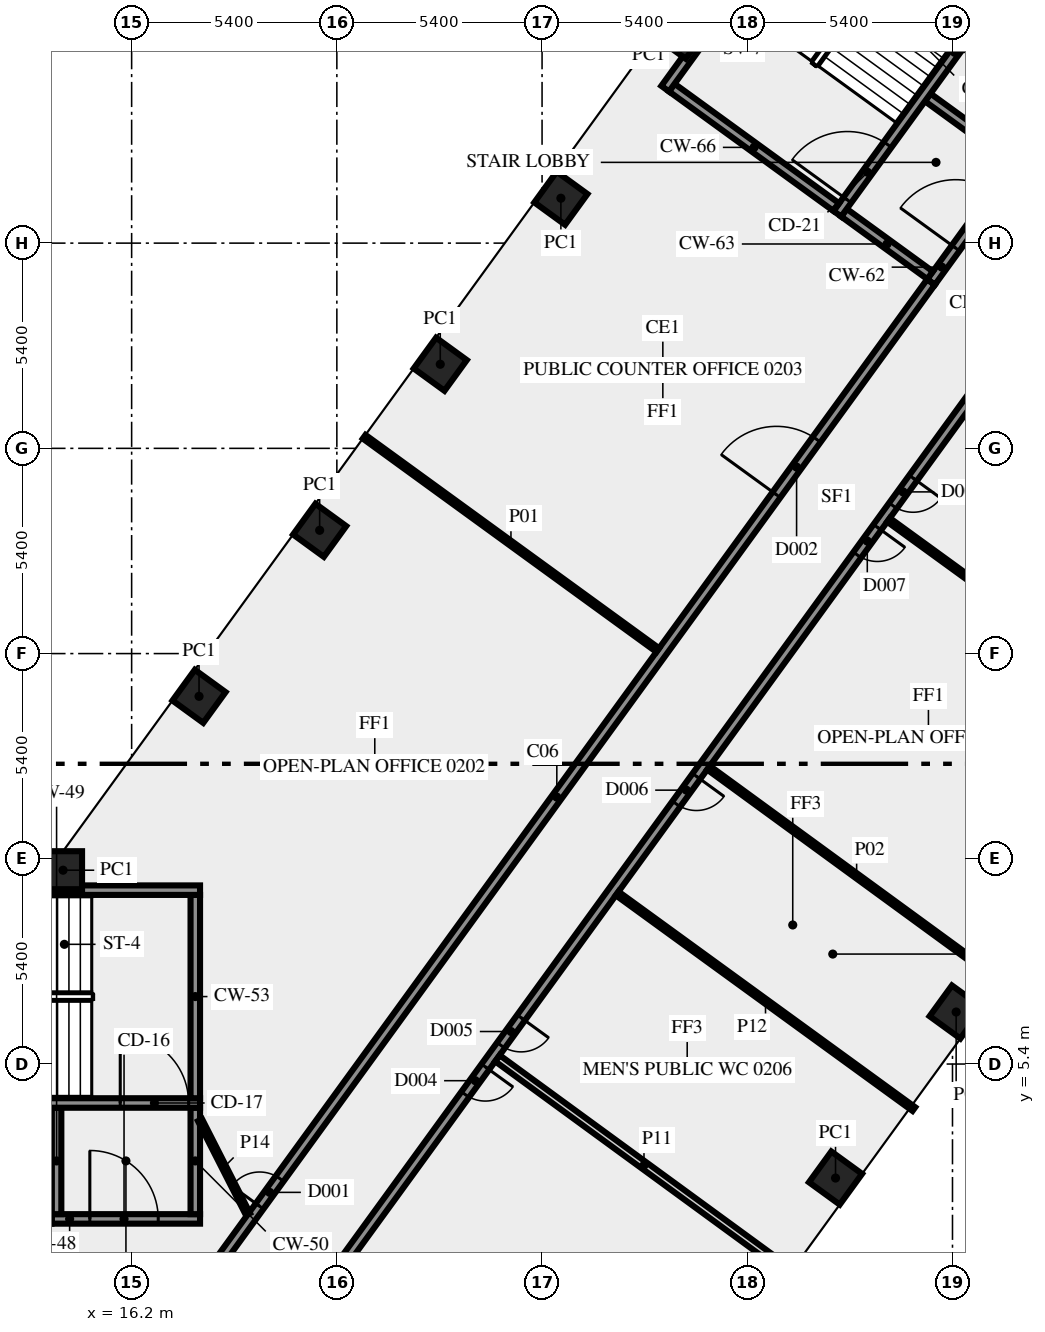
"""IFC4 building model, lengths in metres.
Left out: names, types, materials, properties, quantities, classifications, styles, units other than length and angle.
Written with IfcOpenShell. Run it as: python <this file> out.ifc"""

import sys

from ifc_helpers import new_model, si_unit, direction, frame, frame_2d, origin, origin_2d, place, context, subcontext, project, spatial, rectangle, extrude, element, fill, save


model = new_model("IFC4")
c1 = context("Model", 3, precision=1e-05, world=origin(), true_north=direction((0.0, 1.0)))
c2 = subcontext(c1, "Body", "Model", "MODEL_VIEW")
j1 = project(units=[si_unit("LENGTHUNIT", "METRE"), si_unit("PLANEANGLEUNIT", "RADIAN")], contexts=[c1])
p1 = place(None, origin())
s1 = spatial("IfcSite", under=j1, at=p1, CompositionType="ELEMENT")
p2 = place(p1, origin())
s2 = spatial("IfcBuilding", under=s1, at=p2, CompositionType="ELEMENT")
p3 = place(p2, frame((0.0, 0.0, 11.5)))
s3 = spatial("IfcBuildingStorey", under=s2, at=p3, CompositionType="ELEMENT", Elevation=11.5)
for number, where, z_axis, x_axis in (
    (1, (34.722, 2.4, 0.0), (0.0, 0.0, 1.0), (0.588, 0.809, 0.0)),
    (2, (37.896, 6.769, 0.0), (0.0, 0.0, 1.0), (0.588, 0.809, 0.0)),
    (3, (30.669, 32.55, 0.0), (0.0, 0.0, 1.0), (-0.588, -0.809, 0.0)),
    (4, (27.495, 28.181, 0.0), (0.0, 0.0, 1.0), (-0.588, -0.809, 0.0)),
    (5, (24.321, 23.812, 0.0), (0.0, 0.0, 1.0), (-0.588, -0.809, 0.0)),
    (6, (21.147, 19.444, 0.0), (0.0, 0.0, 1.0), (-0.588, -0.809, 0.0)),
    (7, (17.974, 15.075, 0.0), (0.0, 0.0, 1.0), (-0.588, -0.809, 0.0)),
    (8, (14.395, 10.5, 0.0), (0.0, 0.0, 1.0), (-1.0, 0.0, 0.0)),
):
    element("IfcColumn", number, at=place(p3, frame(where, z_axis=z_axis, x_axis=x_axis)), inside=s3, PredefinedType="COLUMN", context=c2, shape_type="SweptSolid", body=[
        extrude(rectangle(XDim=1.0, YDim=1.0, at=origin_2d()), origin(), (0.0, 0.0, 1.0), 4.1),
    ])
p4 = place(p3, frame((14.1, 1.325, 0.0), z_axis=(0.0, 0.0, 1.0), x_axis=(1.0, 0.0, 0.0)))
e9 = element("IfcWall", 9, at=p4, inside=s3, PredefinedType="SHEAR", context=c2, shape_type="SweptSolid", body=[
    extrude(rectangle(XDim=3.9, YDim=0.25, at=frame_2d((1.95, 0.0))), origin(), (0.0, 0.0, 1.0), 4.1),
])
p5 = place(p4, frame((1.0, 0.0, 0.0)))
e10 = element("IfcOpeningElement", 10, at=p5, cuts=e9, PredefinedType="OPENING", context=c2, shape_type="SweptSolid", body=[
    extrude(rectangle(XDim=1.8, YDim=2.1, at=frame_2d((0.9, 1.05))), frame((0.0, 0.135, 0.0), z_axis=(0.0, -1.0, 0.0), x_axis=(1.0, 0.0, 0.0)), (0.0, 0.0, 1.0), 0.27),
])
for number, where, z_axis, x_axis in (
    (11, (14.225, 1.45, 0.0), (0.0, 0.0, 1.0), (0.0, 1.0, 0.0)),
    (12, (17.875, 1.45, 0.0), (0.0, 0.0, 1.0), (0.0, 1.0, 0.0)),
):
    element("IfcWall", number, at=place(p3, frame(where, z_axis=z_axis, x_axis=x_axis)), inside=s3, PredefinedType="SHEAR", context=c2, shape_type="SweptSolid", body=[
        extrude(rectangle(XDim=2.8, YDim=0.25, at=frame_2d((1.4, 0.0))), origin(), (0.0, 0.0, 1.0), 4.1),
    ])
p6 = place(p3, frame((7.5, 4.375, 0.0), z_axis=(0.0, 0.0, 1.0), x_axis=(1.0, 0.0, 0.0)))
e13 = element("IfcWall", 13, at=p6, inside=s3, PredefinedType="SHEAR", context=c2, shape_type="SweptSolid", body=[
    extrude(rectangle(XDim=10.5, YDim=0.25, at=frame_2d((5.25, 0.0))), origin(), (0.0, 0.0, 1.0), 4.1),
])
p7 = place(p6, frame((8.4, 0.0, 0.0)))
e14 = element("IfcOpeningElement", 14, at=p7, cuts=e13, PredefinedType="OPENING", context=c2, shape_type="SweptSolid", body=[
    extrude(rectangle(XDim=1.8, YDim=2.1, at=frame_2d((0.9, 1.05))), frame((0.0, 0.135, 0.0), z_axis=(0.0, -1.0, 0.0), x_axis=(1.0, 0.0, 0.0)), (0.0, 0.0, 1.0), 0.27),
])
p8 = place(p3, frame((17.875, 4.5, 0.0), z_axis=(0.0, 0.0, 1.0), x_axis=(0.0, 1.0, 0.0)))
e15 = element("IfcWall", 15, at=p8, inside=s3, PredefinedType="SHEAR", context=c2, shape_type="SweptSolid", body=[
    extrude(rectangle(XDim=5.35, YDim=0.25, at=frame_2d((2.675, 0.0))), origin(), (0.0, 0.0, 1.0), 4.1),
])
p9 = place(p3, frame((7.5, 9.975, 0.0), z_axis=(0.0, 0.0, 1.0), x_axis=(1.0, 0.0, 0.0)))
e16 = element("IfcWall", 16, at=p9, inside=s3, PredefinedType="SHEAR", context=c2, shape_type="SweptSolid", body=[
    extrude(rectangle(XDim=10.5, YDim=0.25, at=frame_2d((5.25, 0.0))), origin(), (0.0, 0.0, 1.0), 4.1),
])
p10 = place(p9, frame((2.0, 0.0, 1.0)))
e17 = element("IfcOpeningElement", 17, at=p10, cuts=e16, PredefinedType="OPENING", context=c2, shape_type="SweptSolid", body=[
    extrude(rectangle(XDim=1.2, YDim=1.2, at=frame_2d((0.6, 0.6))), frame((0.0, 0.135, 0.0), z_axis=(0.0, -1.0, 0.0), x_axis=(1.0, 0.0, 0.0)), (0.0, 0.0, 1.0), 0.27),
])
p11 = place(p3, frame((37.238, 25.98, 0.0), z_axis=(0.0, 0.0, 1.0), x_axis=(0.587772420479, 0.809026317077, 0.0)))
e18 = element("IfcWall", 18, at=p11, inside=s3, PredefinedType="SHEAR", context=c2, shape_type="SweptSolid", body=[
    extrude(rectangle(XDim=4.0, YDim=0.25, at=frame_2d((2.0, 0.0))), origin(), (0.0, 0.0, 1.0), 4.1),
])
p12 = place(p11, frame((1.1, 0.0, 0.0)))
e19 = element("IfcOpeningElement", 19, at=p12, cuts=e18, PredefinedType="OPENING", context=c2, shape_type="SweptSolid", body=[
    extrude(rectangle(XDim=1.8, YDim=2.1, at=frame_2d((0.9, 1.05))), frame((0.0, 0.135, 0.0), z_axis=(0.0, -1.0, 0.0), x_axis=(1.0, 0.0, 0.0)), (0.0, 0.0, 1.0), 0.27),
])
for number, where, z_axis, x_axis in (
    (20, (37.21, 26.154, 0.0), (0.0, 0.0, 1.0), (-0.809, 0.588, 0.0)),
    (21, (39.414, 29.188, 0.0), (0.0, 0.0, 1.0), (-0.809, 0.588, 0.0)),
):
    element("IfcWall", number, at=place(p3, frame(where, z_axis=z_axis, x_axis=x_axis)), inside=s3, PredefinedType="SHEAR", context=c2, shape_type="SweptSolid", body=[
        extrude(rectangle(XDim=2.8, YDim=0.25, at=frame_2d((1.4, 0.0))), origin(), (0.0, 0.0, 1.0), 4.1),
    ])
p13 = place(p3, frame((34.77, 27.772, 0.0), z_axis=(0.0, 0.0, 1.0), x_axis=(0.587795589702, 0.809009483706, 0.0)))
e22 = element("IfcWall", 22, at=p13, inside=s3, PredefinedType="SHEAR", context=c2, shape_type="SweptSolid", body=[
    extrude(rectangle(XDim=10.5, YDim=0.25, at=frame_2d((5.25, 0.0))), origin(), (0.0, 0.0, 1.0), 4.1),
])
p14 = place(p13, frame((0.45, 0.0, 0.0)))
e23 = element("IfcOpeningElement", 23, at=p14, cuts=e22, PredefinedType="OPENING", context=c2, shape_type="SweptSolid", body=[
    extrude(rectangle(XDim=1.8, YDim=2.1, at=frame_2d((0.9, 1.05))), frame((0.0, 0.135, 0.0), z_axis=(0.0, -1.0, 0.0), x_axis=(1.0, 0.0, 0.0)), (0.0, 0.0, 1.0), 0.27),
])
p15 = place(p3, frame((34.742, 27.947, 0.0), z_axis=(0.0, 0.0, 1.0), x_axis=(-0.8089984606, 0.587810760999, 0.0)))
e24 = element("IfcWall", 24, at=p15, inside=s3, PredefinedType="SHEAR", context=c2, shape_type="SweptSolid", body=[
    extrude(rectangle(XDim=5.35, YDim=0.25, at=frame_2d((2.675, 0.0))), origin(), (0.0, 0.0, 1.0), 4.1),
])
p16 = place(p3, frame((30.24, 31.064, 0.0), z_axis=(0.0, 0.0, 1.0), x_axis=(0.587795589702, 0.809009483706, 0.0)))
e25 = element("IfcWall", 25, at=p16, inside=s3, PredefinedType="SHEAR", context=c2, shape_type="SweptSolid", body=[
    extrude(rectangle(XDim=10.5, YDim=0.25, at=frame_2d((5.25, 0.0))), origin(), (0.0, 0.0, 1.0), 4.1),
])
p17 = place(p16, frame((2.15, 0.0, 1.0)))
e26 = element("IfcOpeningElement", 26, at=p17, cuts=e25, PredefinedType="OPENING", context=c2, shape_type="SweptSolid", body=[
    extrude(rectangle(XDim=1.2, YDim=1.2, at=frame_2d((0.6, 0.6))), frame((0.0, 0.135, 0.0), z_axis=(0.0, -1.0, 0.0), x_axis=(1.0, 0.0, 0.0)), (0.0, 0.0, 1.0), 0.27),
])
p18 = place(p3, frame((49.869, 38.856, 0.0), z_axis=(0.0, 0.0, 1.0), x_axis=(-0.587784522481, -0.809017524614, 0.0)))
e27 = element("IfcWall", 27, at=p18, inside=s3, PredefinedType="SOLIDWALL", context=c2, shape_type="SweptSolid", body=[
    extrude(rectangle(XDim=49.912, YDim=0.25, at=frame_2d((24.956, 0.0))), origin(), (0.0, 0.0, 1.0), 4.1),
])
p19 = place(p18, frame((23.897, 0.0, 0.0)))
e28 = element("IfcOpeningElement", 28, at=p19, cuts=e27, PredefinedType="OPENING", context=c2, shape_type="SweptSolid", body=[
    extrude(rectangle(XDim=0.9, YDim=2.1, at=frame_2d((0.45, 1.05))), frame((0.0, 0.135, 0.0), z_axis=(0.0, -1.0, 0.0), x_axis=(1.0, 0.0, 0.0)), (0.0, 0.0, 1.0), 0.27),
])
p20 = place(p18, frame((14.196, 0.0, 0.0)))
e29 = element("IfcOpeningElement", 29, at=p20, cuts=e27, PredefinedType="OPENING", context=c2, shape_type="SweptSolid", body=[
    extrude(rectangle(XDim=0.9, YDim=2.1, at=frame_2d((0.45, 1.05))), frame((0.0, 0.135, 0.0), z_axis=(0.0, -1.0, 0.0), x_axis=(1.0, 0.0, 0.0)), (0.0, 0.0, 1.0), 0.27),
])
p21 = place(p18, frame((39.847, 0.0, 0.0)))
e30 = element("IfcOpeningElement", 30, at=p21, cuts=e27, PredefinedType="OPENING", context=c2, shape_type="SweptSolid", body=[
    extrude(rectangle(XDim=0.9, YDim=2.1, at=frame_2d((0.45, 1.05))), frame((0.0, 0.135, 0.0), z_axis=(0.0, -1.0, 0.0), x_axis=(1.0, 0.0, 0.0)), (0.0, 0.0, 1.0), 0.27),
])
p22 = place(p18, frame((41.446, 0.0, 0.0)))
e31 = element("IfcOpeningElement", 31, at=p22, cuts=e27, PredefinedType="OPENING", context=c2, shape_type="SweptSolid", body=[
    extrude(rectangle(XDim=0.9, YDim=2.1, at=frame_2d((0.45, 1.05))), frame((0.0, 0.135, 0.0), z_axis=(0.0, -1.0, 0.0), x_axis=(1.0, 0.0, 0.0)), (0.0, 0.0, 1.0), 0.27),
])
p23 = place(p18, frame((31.997, 0.0, 0.0)))
e32 = element("IfcOpeningElement", 32, at=p23, cuts=e27, PredefinedType="OPENING", context=c2, shape_type="SweptSolid", body=[
    extrude(rectangle(XDim=0.9, YDim=2.1, at=frame_2d((0.45, 1.05))), frame((0.0, 0.135, 0.0), z_axis=(0.0, -1.0, 0.0), x_axis=(1.0, 0.0, 0.0)), (0.0, 0.0, 1.0), 0.27),
])
p24 = place(p18, frame((22.296, 0.0, 0.0)))
e33 = element("IfcOpeningElement", 33, at=p24, cuts=e27, PredefinedType="OPENING", context=c2, shape_type="SweptSolid", body=[
    extrude(rectangle(XDim=0.9, YDim=2.1, at=frame_2d((0.45, 1.05))), frame((0.0, 0.135, 0.0), z_axis=(0.0, -1.0, 0.0), x_axis=(1.0, 0.0, 0.0)), (0.0, 0.0, 1.0), 0.27),
])
p25 = place(p3, frame((17.545, -1.125, 0.0), z_axis=(0.0, 0.0, 1.0), x_axis=(0.587786323093, 0.809016216391, 0.0)))
e34 = element("IfcWall", 34, at=p25, inside=s3, PredefinedType="SOLIDWALL", context=c2, shape_type="SweptSolid", body=[
    extrude(rectangle(XDim=33.493, YDim=0.25, at=frame_2d((16.747, 0.0))), origin(), (0.0, 0.0, 1.0), 4.1),
])
p26 = place(p25, frame((3.441, 0.0, 0.0)))
e35 = element("IfcOpeningElement", 35, at=p26, cuts=e34, PredefinedType="OPENING", context=c2, shape_type="SweptSolid", body=[
    extrude(rectangle(XDim=0.9, YDim=2.1, at=frame_2d((0.45, 1.05))), frame((0.0, 0.135, 0.0), z_axis=(0.0, -1.0, 0.0), x_axis=(1.0, 0.0, 0.0)), (0.0, 0.0, 1.0), 0.27),
])
p27 = place(p25, frame((26.58, 0.0, 0.0)))
e36 = element("IfcOpeningElement", 36, at=p27, cuts=e34, PredefinedType="OPENING", context=c2, shape_type="SweptSolid", body=[
    extrude(rectangle(XDim=1.8, YDim=2.1, at=frame_2d((0.9, 1.05))), frame((0.0, 0.135, 0.0), z_axis=(0.0, -1.0, 0.0), x_axis=(1.0, 0.0, 0.0)), (0.0, 0.0, 1.0), 0.27),
])
p28 = place(p3, frame((30.044, 16.292, 0.0), z_axis=(0.0, 0.0, 1.0), x_axis=(-0.80898585166, 0.587828114175, 0.0)))
e37 = element("IfcWall", 37, at=p28, inside=s3, PredefinedType="PARTITIONING", context=c2, shape_type="SweptSolid", body=[
    extrude(rectangle(XDim=9.55, YDim=0.12, at=frame_2d((4.775, 0.0))), origin(), (0.0, 0.0, 1.0), 3.1),
])
p29 = place(p3, frame((31.38, 13.196, 0.0), z_axis=(0.0, 0.0, 1.0), x_axis=(0.807701085448, -0.589592195137, 0.0)))
e38 = element("IfcWall", 38, at=p29, inside=s3, PredefinedType="PARTITIONING", context=c2, shape_type="SweptSolid", body=[
    extrude(rectangle(XDim=9.651, YDim=0.12, at=frame_2d((4.826, 0.0))), origin(), (0.0, 0.0, 1.0), 3.1),
])
p30 = place(p3, frame((43.844, 14.104, 0.0), z_axis=(0.0, 0.0, 1.0), x_axis=(-0.809102944047, 0.587666934526, 0.0)))
e39 = element("IfcWall", 39, at=p30, inside=s3, PredefinedType="PARTITIONING", context=c2, shape_type="SweptSolid", body=[
    extrude(rectangle(XDim=9.55, YDim=0.12, at=frame_2d((4.775, 0.0))), origin(), (0.0, 0.0, 1.0), 3.1),
])
p31 = place(p3, frame((25.826, 5.551, 0.0), z_axis=(0.0, 0.0, 1.0), x_axis=(0.80759810708, -0.589733242612, 0.0)))
e40 = element("IfcWall", 40, at=p31, inside=s3, PredefinedType="SOLIDWALL", context=c2, shape_type="SweptSolid", body=[
    extrude(rectangle(XDim=9.55, YDim=0.2, at=frame_2d((4.775, 0.0))), origin(), (0.0, 0.0, 1.0), 3.1),
])
p32 = place(p3, frame((36.784, 4.215, 0.0), z_axis=(0.0, 0.0, 1.0), x_axis=(-0.808994179369, 0.587816653173, 0.0)))
e41 = element("IfcWall", 41, at=p32, inside=s3, PredefinedType="PARTITIONING", context=c2, shape_type="SweptSolid", body=[
    extrude(rectangle(XDim=9.651, YDim=0.12, at=frame_2d((4.825, 0.0))), origin(), (0.0, 0.0, 1.0), 3.1),
])
p33 = place(p3, frame((18.0, 3.925, 0.0), z_axis=(0.0, 0.0, 1.0), x_axis=(0.453950796792, -0.891026752736, 0.0)))
e42 = element("IfcWall", 42, at=p33, inside=s3, PredefinedType="PARTITIONING", context=c2, shape_type="SweptSolid", body=[
    extrude(rectangle(XDim=2.778, YDim=0.12, at=frame_2d((1.389, 0.0))), origin(), (0.0, 0.0, 1.0), 4.1),
])
p34 = place(p5, origin())
e43 = element("IfcDoor", 43, at=p34, inside=s3, OperationType="DOUBLE_DOOR_SINGLE_SWING", PredefinedType="DOOR", context=c2, shape_type="SweptSolid", body=[
    extrude(rectangle(XDim=1.8, YDim=2.1, at=frame_2d((0.9, 1.05))), frame((0.0, 0.025, 0.0), z_axis=(0.0, -1.0, 0.0), x_axis=(1.0, 0.0, 0.0)), (0.0, 0.0, 1.0), 0.05),
])
fill(e10, e43)
p35 = place(p7, origin())
e44 = element("IfcDoor", 44, at=p35, inside=s3, OperationType="DOUBLE_DOOR_SINGLE_SWING", PredefinedType="DOOR", context=c2, shape_type="SweptSolid", body=[
    extrude(rectangle(XDim=1.8, YDim=2.1, at=frame_2d((0.9, 1.05))), frame((0.0, 0.025, 0.0), z_axis=(0.0, -1.0, 0.0), x_axis=(1.0, 0.0, 0.0)), (0.0, 0.0, 1.0), 0.05),
])
fill(e14, e44)
p36 = place(p12, origin())
e45 = element("IfcDoor", 45, at=p36, inside=s3, OperationType="DOUBLE_DOOR_SINGLE_SWING", PredefinedType="DOOR", context=c2, shape_type="SweptSolid", body=[
    extrude(rectangle(XDim=1.8, YDim=2.1, at=frame_2d((0.9, 1.05))), frame((0.0, 0.025, 0.0), z_axis=(0.0, -1.0, 0.0), x_axis=(1.0, 0.0, 0.0)), (0.0, 0.0, 1.0), 0.05),
])
fill(e19, e45)
p37 = place(p14, origin())
e46 = element("IfcDoor", 46, at=p37, inside=s3, OperationType="DOUBLE_DOOR_SINGLE_SWING", PredefinedType="DOOR", context=c2, shape_type="SweptSolid", body=[
    extrude(rectangle(XDim=1.8, YDim=2.1, at=frame_2d((0.9, 1.05))), frame((0.0, 0.025, 0.0), z_axis=(0.0, -1.0, 0.0), x_axis=(1.0, 0.0, 0.0)), (0.0, 0.0, 1.0), 0.05),
])
fill(e23, e46)
p38 = place(p26, origin())
e47 = element("IfcDoor", 47, at=p38, inside=s3, OperationType="SINGLE_SWING_LEFT", PredefinedType="DOOR", context=c2, shape_type="SweptSolid", body=[
    extrude(rectangle(XDim=0.9, YDim=2.1, at=frame_2d((0.45, 1.05))), frame((0.0, 0.025, 0.0), z_axis=(0.0, -1.0, 0.0), x_axis=(1.0, 0.0, 0.0)), (0.0, 0.0, 1.0), 0.05),
])
fill(e35, e47)
p39 = place(p19, origin())
e48 = element("IfcDoor", 48, at=p39, inside=s3, OperationType="SINGLE_SWING_LEFT", PredefinedType="DOOR", context=c2, shape_type="SweptSolid", body=[
    extrude(rectangle(XDim=0.9, YDim=2.1, at=frame_2d((0.45, 1.05))), frame((0.0, 0.025, 0.0), z_axis=(0.0, -1.0, 0.0), x_axis=(1.0, 0.0, 0.0)), (0.0, 0.0, 1.0), 0.05),
])
fill(e28, e48)
p40 = place(p27, origin())
e49 = element("IfcDoor", 49, at=p40, inside=s3, OperationType="DOUBLE_DOOR_SINGLE_SWING", PredefinedType="DOOR", context=c2, shape_type="SweptSolid", body=[
    extrude(rectangle(XDim=1.8, YDim=2.1, at=frame_2d((0.9, 1.05))), frame((0.0, 0.025, 0.0), z_axis=(0.0, -1.0, 0.0), x_axis=(1.0, 0.0, 0.0)), (0.0, 0.0, 1.0), 0.05),
])
fill(e36, e49)
p41 = place(p21, origin())
e50 = element("IfcDoor", 50, at=p41, inside=s3, OperationType="SINGLE_SWING_RIGHT", PredefinedType="DOOR", context=c2, shape_type="SweptSolid", body=[
    extrude(rectangle(XDim=0.9, YDim=2.1, at=frame_2d((0.45, 1.05))), frame((0.0, 0.025, 0.0), z_axis=(0.0, -1.0, 0.0), x_axis=(1.0, 0.0, 0.0)), (0.0, 0.0, 1.0), 0.05),
])
fill(e30, e50)
p42 = place(p22, origin())
e51 = element("IfcDoor", 51, at=p42, inside=s3, OperationType="SINGLE_SWING_LEFT", PredefinedType="DOOR", context=c2, shape_type="SweptSolid", body=[
    extrude(rectangle(XDim=0.9, YDim=2.1, at=frame_2d((0.45, 1.05))), frame((0.0, 0.025, 0.0), z_axis=(0.0, -1.0, 0.0), x_axis=(1.0, 0.0, 0.0)), (0.0, 0.0, 1.0), 0.05),
])
fill(e31, e51)
p43 = place(p23, origin())
e52 = element("IfcDoor", 52, at=p43, inside=s3, OperationType="SINGLE_SWING_LEFT", PredefinedType="DOOR", context=c2, shape_type="SweptSolid", body=[
    extrude(rectangle(XDim=0.9, YDim=2.1, at=frame_2d((0.45, 1.05))), frame((0.0, 0.025, 0.0), z_axis=(0.0, -1.0, 0.0), x_axis=(1.0, 0.0, 0.0)), (0.0, 0.0, 1.0), 0.05),
])
fill(e32, e52)
p44 = place(p24, origin())
e53 = element("IfcDoor", 53, at=p44, inside=s3, OperationType="SINGLE_SWING_RIGHT", PredefinedType="DOOR", context=c2, shape_type="SweptSolid", body=[
    extrude(rectangle(XDim=0.9, YDim=2.1, at=frame_2d((0.45, 1.05))), frame((0.0, 0.025, 0.0), z_axis=(0.0, -1.0, 0.0), x_axis=(1.0, 0.0, 0.0)), (0.0, 0.0, 1.0), 0.05),
])
fill(e33, e53)
save(model, sys.argv[1])
